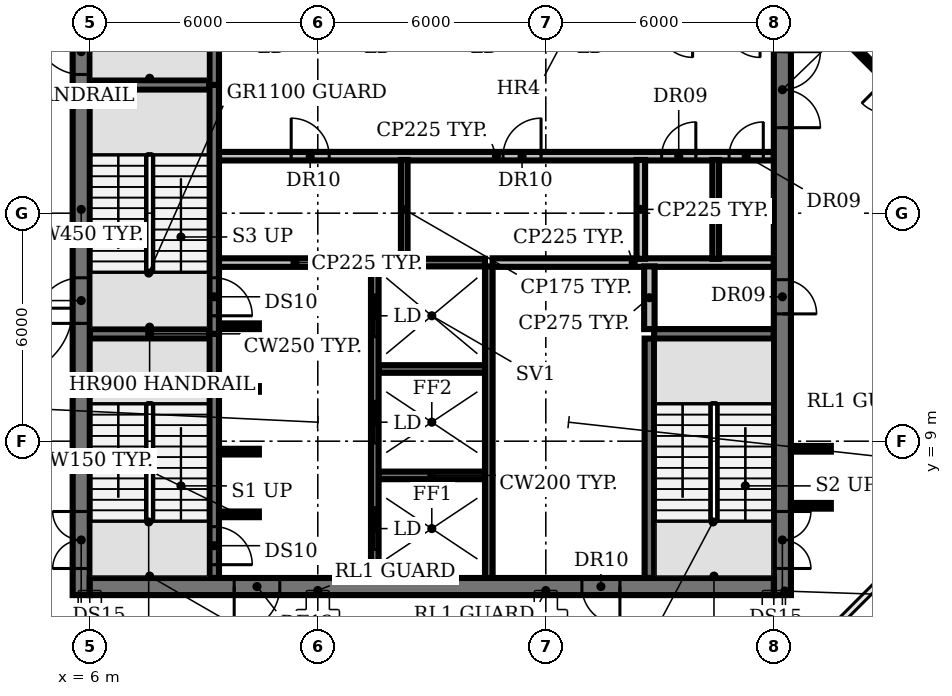
"""IFC4 building model, lengths in metres.
Left out: names, types, materials, properties, quantities, classifications, styles, units other than length and angle.
Written with IfcOpenShell. Run it as: python <this file> out.ifc"""

import sys

from ifc_helpers import new_model, si_unit, direction, frame, frame_2d, origin, place, context, subcontext, project, spatial, rectangle, extrude, element, fill, save


model = new_model("IFC4")
c1 = context("Model", 3, precision=1e-05, world=origin(), true_north=direction((0.0, 1.0)))
c2 = subcontext(c1, "Body", "Model", "MODEL_VIEW")
j1 = project(units=[si_unit("LENGTHUNIT", "METRE"), si_unit("PLANEANGLEUNIT", "RADIAN")], contexts=[c1])
p1 = place(None, origin())
s1 = spatial("IfcSite", under=j1, at=p1, CompositionType="ELEMENT")
p2 = place(p1, origin())
s2 = spatial("IfcBuilding", under=s1, at=p2, CompositionType="ELEMENT")
p3 = place(p2, frame((0.0, 0.0, 255.8)))
s3 = spatial("IfcBuildingStorey", under=s2, at=p3, CompositionType="ELEMENT", Elevation=255.8)
p4 = place(p3, frame((31.05, 14.435, 0.0), z_axis=(0.0, 0.0, 1.0), x_axis=(-0.707106781187, 0.707106781187, 0.0)))
e1 = element("IfcWall", 1, at=p4, inside=s3, PredefinedType="SOLIDWALL", context=c2, shape_type="SweptSolid", body=[
    extrude(rectangle(XDim=8.485, YDim=0.14, at=frame_2d((4.243, 0.0))), origin(), (0.0, 0.0, 1.0), 8.05),
])
p5 = place(p4, frame((3.993, 0.0, 0.0)))
e2 = element("IfcOpeningElement", 2, at=p5, cuts=e1, PredefinedType="OPENING", context=c2, shape_type="SweptSolid", body=[
    extrude(rectangle(XDim=1.8, YDim=2.4, at=frame_2d((0.9, 1.2))), frame((0.0, 0.08, 0.0), z_axis=(0.0, -1.0, 0.0), x_axis=(1.0, 0.0, 0.0)), (0.0, 0.0, 1.0), 0.16),
])
p6 = place(p3, frame((9.4, 7.075, 0.0), z_axis=(0.0, 0.0, 1.0), x_axis=(1.0, 0.0, 0.0)))
e3 = element("IfcWall", 3, at=p6, inside=s3, PredefinedType="SHEAR", context=c2, shape_type="SweptSolid", body=[
    extrude(rectangle(XDim=1.05, YDim=0.15, at=frame_2d((0.525, 0.0))), origin(), (0.0, 0.0, 1.0), 8.05),
])
p7 = place(p3, frame((13.6, 8.1, 0.0), z_axis=(0.0, 0.0, 1.0), x_axis=(1.0, 0.0, 0.0)))
e4 = element("IfcWall", 4, at=p7, inside=s3, PredefinedType="SHEAR", context=c2, shape_type="SweptSolid", body=[
    extrude(rectangle(XDim=2.8, YDim=0.2, at=frame_2d((1.4, 0.0))), origin(), (0.0, 0.0, 1.0), 8.05),
])
for number, where, z_axis, x_axis in (
    (5, (9.4, 8.725, 0.0), (0.0, 0.0, 1.0), (1.0, 0.0, 0.0)),
    (6, (9.4, 10.375, 0.0), (0.0, 0.0, 1.0), (1.0, 0.0, 0.0)),
):
    element("IfcWall", number, at=place(p3, frame(where, z_axis=z_axis, x_axis=x_axis)), inside=s3, PredefinedType="SHEAR", context=c2, shape_type="SweptSolid", body=[
        extrude(rectangle(XDim=1.05, YDim=0.15, at=frame_2d((0.525, 0.0))), origin(), (0.0, 0.0, 1.0), 8.05),
    ])
p8 = place(p3, frame((13.6, 10.9, 0.0), z_axis=(0.0, 0.0, 1.0), x_axis=(1.0, 0.0, 0.0)))
e7 = element("IfcWall", 7, at=p8, inside=s3, PredefinedType="SHEAR", context=c2, shape_type="SweptSolid", body=[
    extrude(rectangle(XDim=2.8, YDim=0.2, at=frame_2d((1.4, 0.0))), origin(), (0.0, 0.0, 1.0), 8.05),
])
for number, where, z_axis, x_axis in (
    (8, (6.0, 11.825, 0.0), (0.0, 0.0, 1.0), (1.0, 0.0, 0.0)),
    (9, (20.85, 11.825, 0.0), (0.0, 0.0, 1.0), (1.0, 0.0, 0.0)),
):
    element("IfcWall", number, at=place(p3, frame(where, z_axis=z_axis, x_axis=x_axis)), inside=s3, PredefinedType="SHEAR", context=c2, shape_type="SweptSolid", body=[
        extrude(rectangle(XDim=3.15, YDim=0.25, at=frame_2d((1.575, 0.0))), origin(), (0.0, 0.0, 1.0), 8.05),
    ])
p9 = place(p3, frame((9.4, 12.025, 0.0), z_axis=(0.0, 0.0, 1.0), x_axis=(1.0, 0.0, 0.0)))
e10 = element("IfcWall", 10, at=p9, inside=s3, PredefinedType="SHEAR", context=c2, shape_type="SweptSolid", body=[
    extrude(rectangle(XDim=1.05, YDim=0.15, at=frame_2d((0.525, 0.0))), origin(), (0.0, 0.0, 1.0), 8.05),
])
p10 = place(p3, frame((9.4, 13.7, 0.0), z_axis=(0.0, 0.0, 1.0), x_axis=(1.0, 0.0, 0.0)))
e11 = element("IfcWall", 11, at=p10, inside=s3, PredefinedType="PARTITIONING", context=c2, shape_type="SweptSolid", body=[
    extrude(rectangle(XDim=4.0, YDim=0.225, at=frame_2d((2.0, 0.0))), origin(), (0.0, 0.0, 1.0), 8.05),
])
p11 = place(p3, frame((13.6, 13.7, 0.0), z_axis=(0.0, 0.0, 1.0), x_axis=(1.0, 0.0, 0.0)))
e12 = element("IfcWall", 12, at=p11, inside=s3, PredefinedType="SHEAR", context=c2, shape_type="SweptSolid", body=[
    extrude(rectangle(XDim=2.8, YDim=0.2, at=frame_2d((1.4, 0.0))), origin(), (0.0, 0.0, 1.0), 8.05),
])
p12 = place(p3, frame((16.6, 13.7, 0.0), z_axis=(0.0, 0.0, 1.0), x_axis=(1.0, 0.0, 0.0)))
e13 = element("IfcWall", 13, at=p12, inside=s3, PredefinedType="PARTITIONING", context=c2, shape_type="SweptSolid", body=[
    extrude(rectangle(XDim=7.4, YDim=0.225, at=frame_2d((3.7, 0.0))), origin(), (0.0, 0.0, 1.0), 8.05),
])
p13 = place(p3, frame((9.4, 16.5, 0.0), z_axis=(0.0, 0.0, 1.0), x_axis=(1.0, 0.0, 0.0)))
e14 = element("IfcWall", 14, at=p13, inside=s3, PredefinedType="PARTITIONING", context=c2, shape_type="SweptSolid", body=[
    extrude(rectangle(XDim=14.6, YDim=0.225, at=frame_2d((7.3, 0.0))), origin(), (0.0, 0.0, 1.0), 8.05),
])
p14 = place(p13, frame((1.9, 0.0, 0.0)))
e15 = element("IfcOpeningElement", 15, at=p14, cuts=e14, PredefinedType="OPENING", context=c2, shape_type="SweptSolid", body=[
    extrude(rectangle(XDim=1.0, YDim=2.1, at=frame_2d((0.5, 1.05))), frame((0.0, 0.123, 0.0), z_axis=(0.0, -1.0, 0.0), x_axis=(1.0, 0.0, 0.0)), (0.0, 0.0, 1.0), 0.245),
])
p15 = place(p13, frame((7.475, 0.0, 0.0)))
e16 = element("IfcOpeningElement", 16, at=p15, cuts=e14, PredefinedType="OPENING", context=c2, shape_type="SweptSolid", body=[
    extrude(rectangle(XDim=1.0, YDim=2.1, at=frame_2d((0.5, 1.05))), frame((0.0, 0.123, 0.0), z_axis=(0.0, -1.0, 0.0), x_axis=(1.0, 0.0, 0.0)), (0.0, 0.0, 1.0), 0.245),
])
p16 = place(p13, frame((11.647, 0.0, 0.0)))
e17 = element("IfcOpeningElement", 17, at=p16, cuts=e14, PredefinedType="OPENING", context=c2, shape_type="SweptSolid", body=[
    extrude(rectangle(XDim=0.9, YDim=2.1, at=frame_2d((0.45, 1.05))), frame((0.0, 0.123, 0.0), z_axis=(0.0, -1.0, 0.0), x_axis=(1.0, 0.0, 0.0)), (0.0, 0.0, 1.0), 0.245),
])
p17 = place(p13, frame((13.423, 0.0, 0.0)))
e18 = element("IfcOpeningElement", 18, at=p17, cuts=e14, PredefinedType="OPENING", context=c2, shape_type="SweptSolid", body=[
    extrude(rectangle(XDim=0.9, YDim=2.1, at=frame_2d((0.45, 1.05))), frame((0.0, 0.123, 0.0), z_axis=(0.0, -1.0, 0.0), x_axis=(1.0, 0.0, 0.0)), (0.0, 0.0, 1.0), 0.245),
])
p18 = place(p3, frame((6.0, 18.375, 0.0), z_axis=(0.0, 0.0, 1.0), x_axis=(1.0, 0.0, 0.0)))
e19 = element("IfcWall", 19, at=p18, inside=s3, PredefinedType="SHEAR", context=c2, shape_type="SweptSolid", body=[
    extrude(rectangle(XDim=3.15, YDim=0.25, at=frame_2d((1.575, 0.0))), origin(), (0.0, 0.0, 1.0), 8.05),
])
p19 = place(p3, frame((9.275, 11.825, 0.0), z_axis=(0.0, 0.0, 1.0), x_axis=(0.0, -1.0, 0.0)))
e20 = element("IfcWall", 20, at=p19, inside=s3, PredefinedType="SHEAR", context=c2, shape_type="SweptSolid", body=[
    extrude(rectangle(XDim=6.425, YDim=0.25, at=frame_2d((3.212, 0.0))), origin(), (0.0, 0.0, 1.0), 8.05),
])
p20 = place(p19, frame((5.075, 0.0, 0.0)))
e21 = element("IfcOpeningElement", 21, at=p20, cuts=e20, PredefinedType="OPENING", context=c2, shape_type="SweptSolid", body=[
    extrude(rectangle(XDim=1.0, YDim=2.1, at=frame_2d((0.5, 1.05))), frame((0.0, 0.135, 0.0), z_axis=(0.0, -1.0, 0.0), x_axis=(1.0, 0.0, 0.0)), (0.0, 0.0, 1.0), 0.27),
])
p21 = place(p3, frame((9.275, 18.375, 0.0), z_axis=(0.0, 0.0, 1.0), x_axis=(0.0, -1.0, 0.0)))
e22 = element("IfcWall", 22, at=p21, inside=s3, PredefinedType="SHEAR", context=c2, shape_type="SweptSolid", body=[
    extrude(rectangle(XDim=6.55, YDim=0.25, at=frame_2d((3.275, 0.0))), origin(), (0.0, 0.0, 1.0), 8.05),
])
p22 = place(p21, frame((5.075, 0.0, 0.0)))
e23 = element("IfcOpeningElement", 23, at=p22, cuts=e22, PredefinedType="OPENING", context=c2, shape_type="SweptSolid", body=[
    extrude(rectangle(XDim=1.0, YDim=2.1, at=frame_2d((0.5, 1.05))), frame((0.0, 0.135, 0.0), z_axis=(0.0, -1.0, 0.0), x_axis=(1.0, 0.0, 0.0)), (0.0, 0.0, 1.0), 0.27),
])
p23 = place(p3, frame((9.275, 18.375, 0.0), z_axis=(0.0, 0.0, 1.0), x_axis=(0.0, 1.0, 0.0)))
e24 = element("IfcWall", 24, at=p23, inside=s3, PredefinedType="SHEAR", context=c2, shape_type="SweptSolid", body=[
    extrude(rectangle(XDim=6.425, YDim=0.25, at=frame_2d((3.212, 0.0))), origin(), (0.0, 0.0, 1.0), 8.05),
])
p24 = place(p3, frame((13.5, 5.4, 0.0), z_axis=(0.0, 0.0, 1.0), x_axis=(0.0, 1.0, 0.0)))
e25 = element("IfcWall", 25, at=p24, inside=s3, PredefinedType="SHEAR", context=c2, shape_type="SweptSolid", body=[
    extrude(rectangle(XDim=8.2, YDim=0.2, at=frame_2d((4.1, 0.0))), origin(), (0.0, 0.0, 1.0), 8.05),
])
p25 = place(p24, frame((0.75, 0.0, 0.0)))
e26 = element("IfcOpeningElement", 26, at=p25, cuts=e25, PredefinedType="OPENING", context=c2, shape_type="SweptSolid", body=[
    extrude(rectangle(XDim=1.1, YDim=2.1, at=frame_2d((0.55, 1.05))), frame((0.0, 0.11, 0.0), z_axis=(0.0, -1.0, 0.0), x_axis=(1.0, 0.0, 0.0)), (0.0, 0.0, 1.0), 0.22),
])
p26 = place(p24, frame((3.55, 0.0, 0.0)))
e27 = element("IfcOpeningElement", 27, at=p26, cuts=e25, PredefinedType="OPENING", context=c2, shape_type="SweptSolid", body=[
    extrude(rectangle(XDim=1.1, YDim=2.1, at=frame_2d((0.55, 1.05))), frame((0.0, 0.11, 0.0), z_axis=(0.0, -1.0, 0.0), x_axis=(1.0, 0.0, 0.0)), (0.0, 0.0, 1.0), 0.22),
])
p27 = place(p24, frame((6.35, 0.0, 0.0)))
e28 = element("IfcOpeningElement", 28, at=p27, cuts=e25, PredefinedType="OPENING", context=c2, shape_type="SweptSolid", body=[
    extrude(rectangle(XDim=1.1, YDim=2.1, at=frame_2d((0.55, 1.05))), frame((0.0, 0.11, 0.0), z_axis=(0.0, -1.0, 0.0), x_axis=(1.0, 0.0, 0.0)), (0.0, 0.0, 1.0), 0.22),
])
p28 = place(p3, frame((14.275, 13.8, 0.0), z_axis=(0.0, 0.0, 1.0), x_axis=(0.0, 1.0, 0.0)))
e29 = element("IfcWall", 29, at=p28, inside=s3, PredefinedType="PARTITIONING", context=c2, shape_type="SweptSolid", body=[
    extrude(rectangle(XDim=2.6, YDim=0.175, at=frame_2d((1.3, 0.0))), origin(), (0.0, 0.0, 1.0), 8.05),
])
p29 = place(p3, frame((16.5, 5.4, 0.0), z_axis=(0.0, 0.0, 1.0), x_axis=(0.0, 1.0, 0.0)))
e30 = element("IfcWall", 30, at=p29, inside=s3, PredefinedType="SHEAR", context=c2, shape_type="SweptSolid", body=[
    extrude(rectangle(XDim=8.2, YDim=0.2, at=frame_2d((4.1, 0.0))), origin(), (0.0, 0.0, 1.0), 8.05),
])
p30 = place(p3, frame((20.5, 13.8, 0.0), z_axis=(0.0, 0.0, 1.0), x_axis=(0.0, 1.0, 0.0)))
e31 = element("IfcWall", 31, at=p30, inside=s3, PredefinedType="PARTITIONING", context=c2, shape_type="SweptSolid", body=[
    extrude(rectangle(XDim=2.6, YDim=0.225, at=frame_2d((1.3, 0.0))), origin(), (0.0, 0.0, 1.0), 8.05),
])
p31 = place(p3, frame((20.725, 5.4, 0.0), z_axis=(0.0, 0.0, 1.0), x_axis=(0.0, 1.0, 0.0)))
e32 = element("IfcWall", 32, at=p31, inside=s3, PredefinedType="SHEAR", context=c2, shape_type="SweptSolid", body=[
    extrude(rectangle(XDim=6.3, YDim=0.25, at=frame_2d((3.15, 0.0))), origin(), (0.0, 0.0, 1.0), 8.05),
])
p32 = place(p3, frame((20.725, 11.95, 0.0), z_axis=(0.0, 0.0, 1.0), x_axis=(0.0, 1.0, 0.0)))
e33 = element("IfcWall", 33, at=p32, inside=s3, PredefinedType="PARTITIONING", context=c2, shape_type="SweptSolid", body=[
    extrude(rectangle(XDim=1.65, YDim=0.275, at=frame_2d((0.825, 0.0))), origin(), (0.0, 0.0, 1.0), 8.05),
])
p33 = place(p3, frame((22.47, 13.8, 0.0), z_axis=(0.0, 0.0, 1.0), x_axis=(0.0, 1.0, 0.0)))
e34 = element("IfcWall", 34, at=p33, inside=s3, PredefinedType="PARTITIONING", context=c2, shape_type="SweptSolid", body=[
    extrude(rectangle(XDim=2.6, YDim=0.175, at=frame_2d((1.3, 0.0))), origin(), (0.0, 0.0, 1.0), 8.05),
])
p34 = place(p3, frame((5.775, 4.95, 0.0), z_axis=(0.0, 0.0, 1.0), x_axis=(0.0, 1.0, 0.0)))
e35 = element("IfcWall", 35, at=p34, inside=s3, PredefinedType="SHEAR", context=c2, shape_type="SweptSolid", body=[
    extrude(rectangle(XDim=20.3, YDim=0.45, at=frame_2d((10.15, 0.0))), origin(), (0.0, 0.0, 1.0), 8.05),
])
p35 = place(p34, frame((0.7, 0.0, 0.0)))
e36 = element("IfcOpeningElement", 36, at=p35, cuts=e35, PredefinedType="OPENING", context=c2, shape_type="SweptSolid", body=[
    extrude(rectangle(XDim=1.5, YDim=2.1, at=frame_2d((0.75, 1.05))), frame((0.0, 0.235, 0.0), z_axis=(0.0, -1.0, 0.0), x_axis=(1.0, 0.0, 0.0)), (0.0, 0.0, 1.0), 0.47),
])
p36 = place(p34, frame((7.15, 0.0, 0.0)))
e37 = element("IfcOpeningElement", 37, at=p36, cuts=e35, PredefinedType="OPENING", context=c2, shape_type="SweptSolid", body=[
    extrude(rectangle(XDim=1.2, YDim=2.1, at=frame_2d((0.6, 1.05))), frame((0.0, 0.235, 0.0), z_axis=(0.0, -1.0, 0.0), x_axis=(1.0, 0.0, 0.0)), (0.0, 0.0, 1.0), 0.47),
])
p37 = place(p34, frame((13.7, 0.0, 0.0)))
e38 = element("IfcOpeningElement", 38, at=p37, cuts=e35, PredefinedType="OPENING", context=c2, shape_type="SweptSolid", body=[
    extrude(rectangle(XDim=1.2, YDim=2.1, at=frame_2d((0.6, 1.05))), frame((0.0, 0.235, 0.0), z_axis=(0.0, -1.0, 0.0), x_axis=(1.0, 0.0, 0.0)), (0.0, 0.0, 1.0), 0.47),
])
p38 = place(p3, frame((24.225, 25.25, 0.0), z_axis=(0.0, 0.0, 1.0), x_axis=(0.0, -1.0, 0.0)))
e39 = element("IfcWall", 39, at=p38, inside=s3, PredefinedType="SHEAR", context=c2, shape_type="SweptSolid", body=[
    extrude(rectangle(XDim=20.3, YDim=0.45, at=frame_2d((10.15, 0.0))), origin(), (0.0, 0.0, 1.0), 8.05),
])
p39 = place(p38, frame((18.1, 0.0, 0.0)))
e40 = element("IfcOpeningElement", 40, at=p39, cuts=e39, PredefinedType="OPENING", context=c2, shape_type="SweptSolid", body=[
    extrude(rectangle(XDim=1.5, YDim=2.1, at=frame_2d((0.75, 1.05))), frame((0.0, 0.235, 0.0), z_axis=(0.0, -1.0, 0.0), x_axis=(1.0, 0.0, 0.0)), (0.0, 0.0, 1.0), 0.47),
])
p40 = place(p38, frame((12.0, 0.0, 0.0)))
e41 = element("IfcOpeningElement", 41, at=p40, cuts=e39, PredefinedType="OPENING", context=c2, shape_type="SweptSolid", body=[
    extrude(rectangle(XDim=0.9, YDim=2.1, at=frame_2d((0.45, 1.05))), frame((0.0, 0.235, 0.0), z_axis=(0.0, -1.0, 0.0), x_axis=(1.0, 0.0, 0.0)), (0.0, 0.0, 1.0), 0.47),
])
p41 = place(p38, frame((6.0, 0.0, 0.0)))
e42 = element("IfcOpeningElement", 42, at=p41, cuts=e39, PredefinedType="OPENING", context=c2, shape_type="SweptSolid", body=[
    extrude(rectangle(XDim=2.0, YDim=2.1, at=frame_2d((1.0, 1.05))), frame((0.0, 0.235, 0.0), z_axis=(0.0, -1.0, 0.0), x_axis=(1.0, 0.0, 0.0)), (0.0, 0.0, 1.0), 0.47),
])
p42 = place(p3, frame((24.0, 5.175, 0.0), z_axis=(0.0, 0.0, 1.0), x_axis=(-1.0, 0.0, 0.0)))
e43 = element("IfcWall", 43, at=p42, inside=s3, PredefinedType="SHEAR", context=c2, shape_type="SweptSolid", body=[
    extrude(rectangle(XDim=18.0, YDim=0.45, at=frame_2d((9.0, 0.0))), origin(), (0.0, 0.0, 1.0), 8.05),
])
p43 = place(p42, frame((13.0, 0.0, 0.0)))
e44 = element("IfcOpeningElement", 44, at=p43, cuts=e43, PredefinedType="OPENING", context=c2, shape_type="SweptSolid", body=[
    extrude(rectangle(XDim=1.2, YDim=2.1, at=frame_2d((0.6, 1.05))), frame((0.0, 0.235, 0.0), z_axis=(0.0, -1.0, 0.0), x_axis=(1.0, 0.0, 0.0)), (0.0, 0.0, 1.0), 0.47),
])
p44 = place(p42, frame((4.05, 0.0, 0.0)))
e45 = element("IfcOpeningElement", 45, at=p44, cuts=e43, PredefinedType="OPENING", context=c2, shape_type="SweptSolid", body=[
    extrude(rectangle(XDim=1.0, YDim=2.1, at=frame_2d((0.5, 1.05))), frame((0.0, 0.235, 0.0), z_axis=(0.0, -1.0, 0.0), x_axis=(1.0, 0.0, 0.0)), (0.0, 0.0, 1.0), 0.47),
])
for number, where, z_axis, x_axis in (
    (46, (24.45, 7.3, 0.0), (0.0, 0.0, 1.0), (1.0, 0.0, 0.0)),
    (47, (24.45, 8.8, 0.0), (0.0, 0.0, 1.0), (1.0, 0.0, 0.0)),
):
    element("IfcWall", number, at=place(p3, frame(where, z_axis=z_axis, x_axis=x_axis)), inside=s3, PredefinedType="PARTITIONING", context=c2, shape_type="SweptSolid", body=[
        extrude(rectangle(XDim=1.05, YDim=0.15, at=frame_2d((0.525, 0.0))), origin(), (0.0, 0.0, 1.0), 6.33),
    ])
p45 = place(p14, origin())
e48 = element("IfcDoor", 48, at=p45, inside=s3, OperationType="SINGLE_SWING_LEFT", PredefinedType="DOOR", context=c2, shape_type="SweptSolid", body=[
    extrude(rectangle(XDim=1.0, YDim=2.1, at=frame_2d((0.5, 1.05))), frame((0.0, 0.025, 0.0), z_axis=(0.0, -1.0, 0.0), x_axis=(1.0, 0.0, 0.0)), (0.0, 0.0, 1.0), 0.05),
])
fill(e15, e48)
p46 = place(p15, origin())
e49 = element("IfcDoor", 49, at=p46, inside=s3, OperationType="SINGLE_SWING_RIGHT", PredefinedType="DOOR", context=c2, shape_type="SweptSolid", body=[
    extrude(rectangle(XDim=1.0, YDim=2.1, at=frame_2d((0.5, 1.05))), frame((0.0, 0.025, 0.0), z_axis=(0.0, -1.0, 0.0), x_axis=(1.0, 0.0, 0.0)), (0.0, 0.0, 1.0), 0.05),
])
fill(e16, e49)
p47 = place(p16, origin())
e50 = element("IfcDoor", 50, at=p47, inside=s3, OperationType="SINGLE_SWING_RIGHT", PredefinedType="DOOR", context=c2, shape_type="SweptSolid", body=[
    extrude(rectangle(XDim=0.9, YDim=2.1, at=frame_2d((0.45, 1.05))), frame((0.0, 0.025, 0.0), z_axis=(0.0, -1.0, 0.0), x_axis=(1.0, 0.0, 0.0)), (0.0, 0.0, 1.0), 0.05),
])
fill(e17, e50)
p48 = place(p17, origin())
e51 = element("IfcDoor", 51, at=p48, inside=s3, OperationType="SINGLE_SWING_RIGHT", PredefinedType="DOOR", context=c2, shape_type="SweptSolid", body=[
    extrude(rectangle(XDim=0.9, YDim=2.1, at=frame_2d((0.45, 1.05))), frame((0.0, 0.025, 0.0), z_axis=(0.0, -1.0, 0.0), x_axis=(1.0, 0.0, 0.0)), (0.0, 0.0, 1.0), 0.05),
])
fill(e18, e51)
p49 = place(p20, origin())
e52 = element("IfcDoor", 52, at=p49, inside=s3, OperationType="SINGLE_SWING_RIGHT", PredefinedType="DOOR", context=c2, shape_type="SweptSolid", body=[
    extrude(rectangle(XDim=1.0, YDim=2.1, at=frame_2d((0.5, 1.05))), frame((0.0, 0.025, 0.0), z_axis=(0.0, -1.0, 0.0), x_axis=(1.0, 0.0, 0.0)), (0.0, 0.0, 1.0), 0.05),
])
fill(e21, e52)
p50 = place(p22, origin())
e53 = element("IfcDoor", 53, at=p50, inside=s3, OperationType="SINGLE_SWING_RIGHT", PredefinedType="DOOR", context=c2, shape_type="SweptSolid", body=[
    extrude(rectangle(XDim=1.0, YDim=2.1, at=frame_2d((0.5, 1.05))), frame((0.0, 0.025, 0.0), z_axis=(0.0, -1.0, 0.0), x_axis=(1.0, 0.0, 0.0)), (0.0, 0.0, 1.0), 0.05),
])
fill(e23, e53)
p51 = place(p25, origin())
e54 = element("IfcDoor", 54, at=p51, inside=s3, OperationType="DOUBLE_DOOR_SLIDING", PredefinedType="DOOR", context=c2, shape_type="SweptSolid", body=[
    extrude(rectangle(XDim=1.1, YDim=2.1, at=frame_2d((0.55, 1.05))), frame((0.0, 0.025, 0.0), z_axis=(0.0, -1.0, 0.0), x_axis=(1.0, 0.0, 0.0)), (0.0, 0.0, 1.0), 0.05),
])
fill(e26, e54)
p52 = place(p26, origin())
e55 = element("IfcDoor", 55, at=p52, inside=s3, OperationType="DOUBLE_DOOR_SLIDING", PredefinedType="DOOR", context=c2, shape_type="SweptSolid", body=[
    extrude(rectangle(XDim=1.1, YDim=2.1, at=frame_2d((0.55, 1.05))), frame((0.0, 0.025, 0.0), z_axis=(0.0, -1.0, 0.0), x_axis=(1.0, 0.0, 0.0)), (0.0, 0.0, 1.0), 0.05),
])
fill(e27, e55)
p53 = place(p27, origin())
e56 = element("IfcDoor", 56, at=p53, inside=s3, OperationType="DOUBLE_DOOR_SLIDING", PredefinedType="DOOR", context=c2, shape_type="SweptSolid", body=[
    extrude(rectangle(XDim=1.1, YDim=2.1, at=frame_2d((0.55, 1.05))), frame((0.0, 0.025, 0.0), z_axis=(0.0, -1.0, 0.0), x_axis=(1.0, 0.0, 0.0)), (0.0, 0.0, 1.0), 0.05),
])
fill(e28, e56)
p54 = place(p35, origin())
e57 = element("IfcDoor", 57, at=p54, inside=s3, OperationType="DOUBLE_DOOR_SINGLE_SWING", PredefinedType="DOOR", context=c2, shape_type="SweptSolid", body=[
    extrude(rectangle(XDim=1.5, YDim=2.1, at=frame_2d((0.75, 1.05))), frame((0.0, 0.025, 0.0), z_axis=(0.0, -1.0, 0.0), x_axis=(1.0, 0.0, 0.0)), (0.0, 0.0, 1.0), 0.05),
])
fill(e36, e57)
p55 = place(p36, origin())
e58 = element("IfcDoor", 58, at=p55, inside=s3, OperationType="SINGLE_SWING_LEFT", PredefinedType="DOOR", context=c2, shape_type="SweptSolid", body=[
    extrude(rectangle(XDim=1.2, YDim=2.1, at=frame_2d((0.6, 1.05))), frame((0.0, 0.025, 0.0), z_axis=(0.0, -1.0, 0.0), x_axis=(1.0, 0.0, 0.0)), (0.0, 0.0, 1.0), 0.05),
])
fill(e37, e58)
p56 = place(p37, origin())
e59 = element("IfcDoor", 59, at=p56, inside=s3, OperationType="SINGLE_SWING_RIGHT", PredefinedType="DOOR", context=c2, shape_type="SweptSolid", body=[
    extrude(rectangle(XDim=1.2, YDim=2.1, at=frame_2d((0.6, 1.05))), frame((0.0, 0.025, 0.0), z_axis=(0.0, -1.0, 0.0), x_axis=(1.0, 0.0, 0.0)), (0.0, 0.0, 1.0), 0.05),
])
fill(e38, e59)
p57 = place(p39, origin())
e60 = element("IfcDoor", 60, at=p57, inside=s3, OperationType="DOUBLE_DOOR_SINGLE_SWING", PredefinedType="DOOR", context=c2, shape_type="SweptSolid", body=[
    extrude(rectangle(XDim=1.5, YDim=2.1, at=frame_2d((0.75, 1.05))), frame((0.0, 0.025, 0.0), z_axis=(0.0, -1.0, 0.0), x_axis=(1.0, 0.0, 0.0)), (0.0, 0.0, 1.0), 0.05),
])
fill(e40, e60)
p58 = place(p40, origin())
e61 = element("IfcDoor", 61, at=p58, inside=s3, OperationType="SINGLE_SWING_RIGHT", PredefinedType="DOOR", context=c2, shape_type="SweptSolid", body=[
    extrude(rectangle(XDim=0.9, YDim=2.1, at=frame_2d((0.45, 1.05))), frame((0.0, 0.025, 0.0), z_axis=(0.0, -1.0, 0.0), x_axis=(1.0, 0.0, 0.0)), (0.0, 0.0, 1.0), 0.05),
])
fill(e41, e61)
p59 = place(p41, origin())
e62 = element("IfcDoor", 62, at=p59, inside=s3, OperationType="DOUBLE_DOOR_SINGLE_SWING", PredefinedType="DOOR", context=c2, shape_type="SweptSolid", body=[
    extrude(rectangle(XDim=2.0, YDim=2.1, at=frame_2d((1.0, 1.05))), frame((0.0, 0.025, 0.0), z_axis=(0.0, -1.0, 0.0), x_axis=(1.0, 0.0, 0.0)), (0.0, 0.0, 1.0), 0.05),
])
fill(e42, e62)
p60 = place(p43, origin())
e63 = element("IfcDoor", 63, at=p60, inside=s3, OperationType="SINGLE_SWING_RIGHT", PredefinedType="DOOR", context=c2, shape_type="SweptSolid", body=[
    extrude(rectangle(XDim=1.2, YDim=2.1, at=frame_2d((0.6, 1.05))), frame((0.0, 0.025, 0.0), z_axis=(0.0, -1.0, 0.0), x_axis=(1.0, 0.0, 0.0)), (0.0, 0.0, 1.0), 0.05),
])
fill(e44, e63)
p61 = place(p44, origin())
e64 = element("IfcDoor", 64, at=p61, inside=s3, OperationType="SINGLE_SWING_LEFT", PredefinedType="DOOR", context=c2, shape_type="SweptSolid", body=[
    extrude(rectangle(XDim=1.0, YDim=2.1, at=frame_2d((0.5, 1.05))), frame((0.0, 0.025, 0.0), z_axis=(0.0, -1.0, 0.0), x_axis=(1.0, 0.0, 0.0)), (0.0, 0.0, 1.0), 0.05),
])
fill(e45, e64)
save(model, sys.argv[1])
